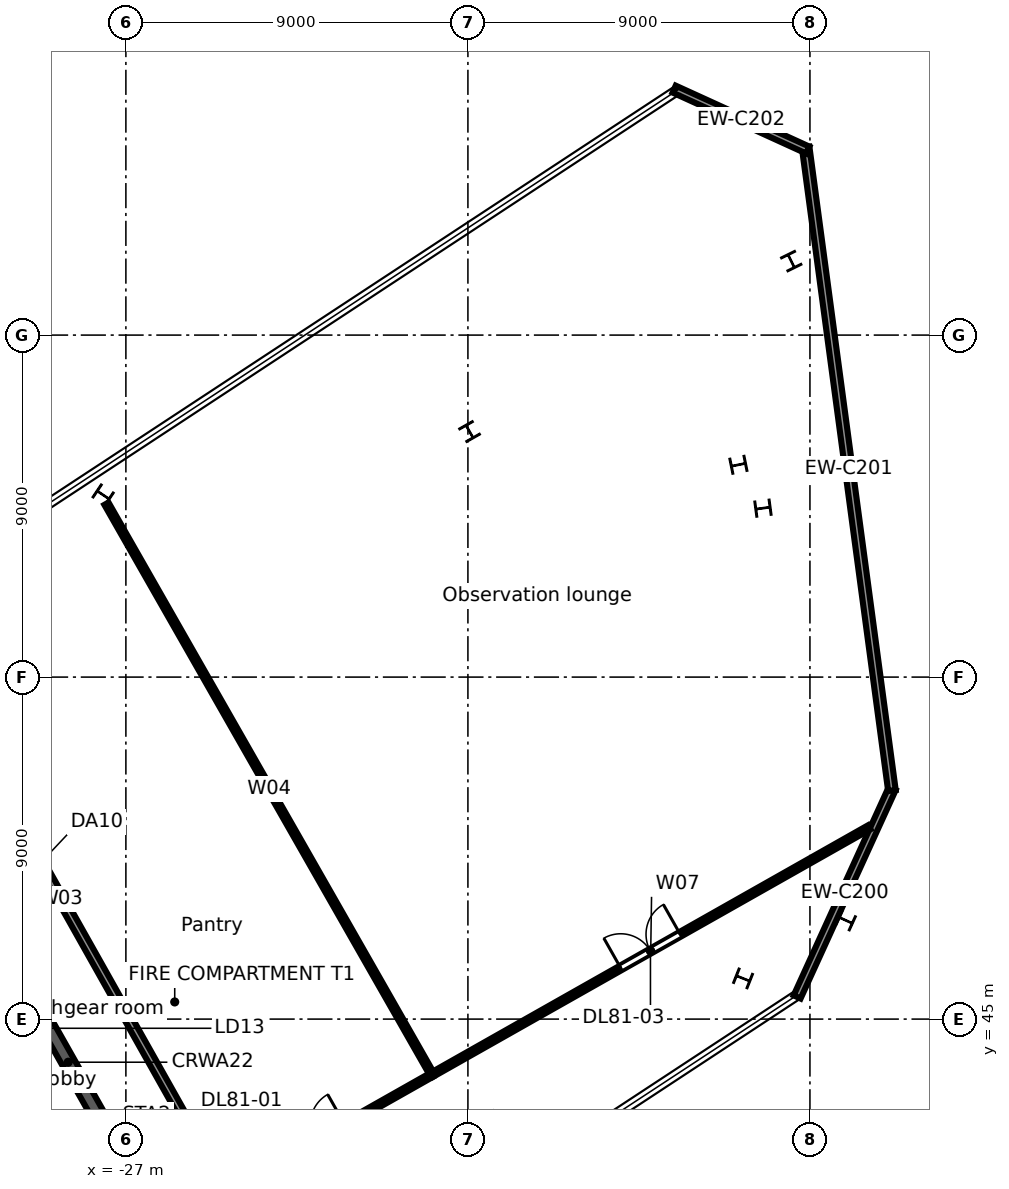
"""IFC4 building model, lengths in metres.
Left out: names, types, materials, properties, quantities, classifications, styles, units other than length and angle.
Written with IfcOpenShell. Run it as: python <this file> out.ifc"""

import sys

from ifc_helpers import new_model, si_unit, direction, frame, frame_2d, origin, origin_2d, place, context, subcontext, project, spatial, rectangle, i_section, extrude, element, fill, save


model = new_model("IFC4")
c1 = context("Model", 3, precision=1e-05, world=origin(), true_north=direction((0.0, 1.0)))
c2 = subcontext(c1, "Body", "Model", "MODEL_VIEW")
j1 = project(units=[si_unit("LENGTHUNIT", "METRE"), si_unit("PLANEANGLEUNIT", "RADIAN")], contexts=[c1])
p1 = place(None, origin())
s1 = spatial("IfcSite", under=j1, at=p1, CompositionType="ELEMENT")
p2 = place(p1, origin())
s2 = spatial("IfcBuilding", under=s1, at=p2, CompositionType="ELEMENT")
p3 = place(p2, frame((0.0, 0.0, 357.7)))
s3 = spatial("IfcBuildingStorey", under=s2, at=p3, CompositionType="ELEMENT", Elevation=357.7)
for number, where, z_axis, x_axis in (
    (1, (-8.058, 47.599, 0.0), (0.0, 0.0, 1.0), (0.415, 0.91, 0.0)),
    (2, (-10.237, 58.445, 0.0), (0.0, 0.0, 1.0), (-0.133, 0.991, 0.0)),
    (3, (-9.492, 64.947, 0.0), (0.0, 0.0, 1.0), (-0.898, -0.441, 0.0)),
    (4, (-17.957, 60.462, 0.0), (0.0, 0.0, 1.0), (0.87, 0.492, 0.0)),
    (5, (-27.598, 58.793, 0.0), (0.0, 0.0, 1.0), (0.558, 0.83, 0.0)),
):
    element("IfcColumn", number, at=place(p3, frame(where, z_axis=z_axis, x_axis=x_axis)), inside=s3, PredefinedType="COLUMN", context=c2, shape_type="SweptSolid", body=[
        extrude(i_section(OverallWidth=0.4, OverallDepth=0.4, WebThickness=0.013, FlangeThickness=0.021, FilletRadius=0.022, at=origin_2d()), origin(), (0.0, 0.0, 1.0), 3.3),
    ])
for number, where, z_axis, x_axis in (
    (6, (-10.76, 46.071, 0.0), (0.0, 0.0, 1.0), (0.369, 0.929, 0.0)),
    (7, (-10.882, 59.587, 0.0), (0.0, 0.0, 1.0), (-0.199, 0.98, 0.0)),
):
    element("IfcColumn", number, at=place(p3, frame(where, z_axis=z_axis, x_axis=x_axis)), inside=s3, PredefinedType="COLUMN", context=c2, shape_type="SweptSolid", body=[
        extrude(i_section(OverallWidth=0.4, OverallDepth=0.4, WebThickness=0.013, FlangeThickness=0.021, FilletRadius=0.022, at=origin_2d()), origin(), (0.0, 0.0, 1.0), 3.6),
    ])
p4 = place(p3, frame((-6.834, 51.069, 0.0), z_axis=(0.0, 0.0, 1.0), x_axis=(-0.415043982488, -0.909801347878, 0.0)))
e8 = element("IfcWall", 8, at=p4, inside=s3, PredefinedType="STANDARD", context=c2, shape_type="SweptSolid", body=[
    extrude(rectangle(XDim=6.031, YDim=0.2, at=frame_2d((3.015, 0.0))), origin(), (0.0, 0.0, 1.0), 2.7),
])
p5 = place(p3, frame((-9.114, 67.947, 0.0), z_axis=(0.0, 0.0, 1.0), x_axis=(0.132931254717, -0.991125260257, 0.0)))
e9 = element("IfcWall", 9, at=p5, inside=s3, PredefinedType="STANDARD", context=c2, shape_type="SweptSolid", body=[
    extrude(rectangle(XDim=17.084, YDim=0.2, at=frame_2d((8.542, 0.0))), origin(), (0.0, 0.0, 1.0), 3.3),
])
p6 = place(p3, frame((-12.573, 69.474, 0.0), z_axis=(0.0, 0.0, 1.0), x_axis=(0.909798966616, -0.415049202318, 0.0)))
e10 = element("IfcWall", 10, at=p6, inside=s3, PredefinedType="STANDARD", context=c2, shape_type="SweptSolid", body=[
    extrude(rectangle(XDim=3.866, YDim=0.2, at=frame_2d((1.933, 0.0))), origin(), (0.0, 0.0, 1.0), 3.3),
])
p7 = place(p3, frame((-31.792, 49.653, 0.0), z_axis=(0.0, 0.0, 1.0), x_axis=(0.492421943245, -0.870356610712, 0.0)))
e11 = element("IfcWall", 11, at=p7, inside=s3, PredefinedType="SOLIDWALL", context=c2, shape_type="SweptSolid", body=[
    extrude(rectangle(XDim=13.3, YDim=0.35, at=frame_2d((6.65, 0.0))), origin(), (0.0, 0.0, 1.0), 3.3),
])
p8 = place(p3, frame((-33.042, 55.86, 0.0), z_axis=(0.0, 0.0, 1.0), x_axis=(0.490288138745, -0.871560405828, 0.0)))
e12 = element("IfcWall", 12, at=p8, inside=s3, PredefinedType="PARTITIONING", context=c2, shape_type="SweptSolid", body=[
    extrude(rectangle(XDim=17.667, YDim=0.2, at=frame_2d((8.834, 0.0))), origin(), (0.0, 0.0, 1.0), 2.18),
])
p9 = place(p3, frame((-27.511, 58.564, 0.0), z_axis=(0.0, 0.0, 1.0), x_axis=(0.495459338806, -0.868631132063, 0.0)))
e13 = element("IfcWall", 13, at=p9, inside=s3, PredefinedType="PARTITIONING", context=c2, shape_type="SweptSolid", body=[
    extrude(rectangle(XDim=17.297, YDim=0.125, at=frame_2d((8.648, 0.0))), origin(), (0.0, 0.0, 1.0), 3.3),
])
p10 = place(p3, frame((-24.38, 40.462, 0.0), z_axis=(0.0, 0.0, 1.0), x_axis=(0.87036048388, 0.492415097353, 0.0)))
e14 = element("IfcWall", 14, at=p10, inside=s3, PredefinedType="PARTITIONING", context=c2, shape_type="SweptSolid", body=[
    extrude(rectangle(XDim=6.249, YDim=0.125, at=frame_2d((3.125, 0.0))), origin(), (0.0, 0.0, 1.0), 3.3),
])
p11 = place(p10, frame((2.7, 0.0, 0.0)))
e15 = element("IfcOpeningElement", 15, at=p11, cuts=e14, PredefinedType="OPENING", context=c2, shape_type="SweptSolid", body=[
    extrude(rectangle(XDim=0.9, YDim=2.1, at=frame_2d((0.45, 1.05))), frame((0.0, 0.073, 0.0), z_axis=(0.0, -1.0, 0.0), x_axis=(1.0, 0.0, 0.0)), (0.0, 0.0, 1.0), 0.145),
])
p12 = place(p3, frame((-18.941, 43.539, 0.0), z_axis=(0.0, 0.0, 1.0), x_axis=(0.870355301806, 0.492424256733, 0.0)))
e16 = element("IfcWall", 16, at=p12, inside=s3, PredefinedType="PARTITIONING", context=c2, shape_type="SweptSolid", body=[
    extrude(rectangle(XDim=13.216, YDim=0.125, at=frame_2d((6.608, 0.0))), origin(), (0.0, 0.0, 1.0), 2.68),
])
p13 = place(p12, frame((5.7, 0.0, 0.0)))
e17 = element("IfcOpeningElement", 17, at=p13, cuts=e16, PredefinedType="OPENING", context=c2, shape_type="SweptSolid", body=[
    extrude(rectangle(XDim=1.8, YDim=2.1, at=frame_2d((0.9, 1.05))), frame((0.0, 0.073, 0.0), z_axis=(0.0, -1.0, 0.0), x_axis=(1.0, 0.0, 0.0)), (0.0, 0.0, 1.0), 0.145),
])
p14 = place(p13, origin())
e18 = element("IfcDoor", 18, at=p14, inside=s3, OperationType="DOUBLE_DOOR_SINGLE_SWING", PredefinedType="DOOR", context=c2, shape_type="SweptSolid", body=[
    extrude(rectangle(XDim=1.8, YDim=2.1, at=frame_2d((0.9, 1.05))), frame((0.0, 0.025, 0.0), z_axis=(0.0, -1.0, 0.0), x_axis=(1.0, 0.0, 0.0)), (0.0, 0.0, 1.0), 0.05),
])
fill(e17, e18)
save(model, sys.argv[1])
